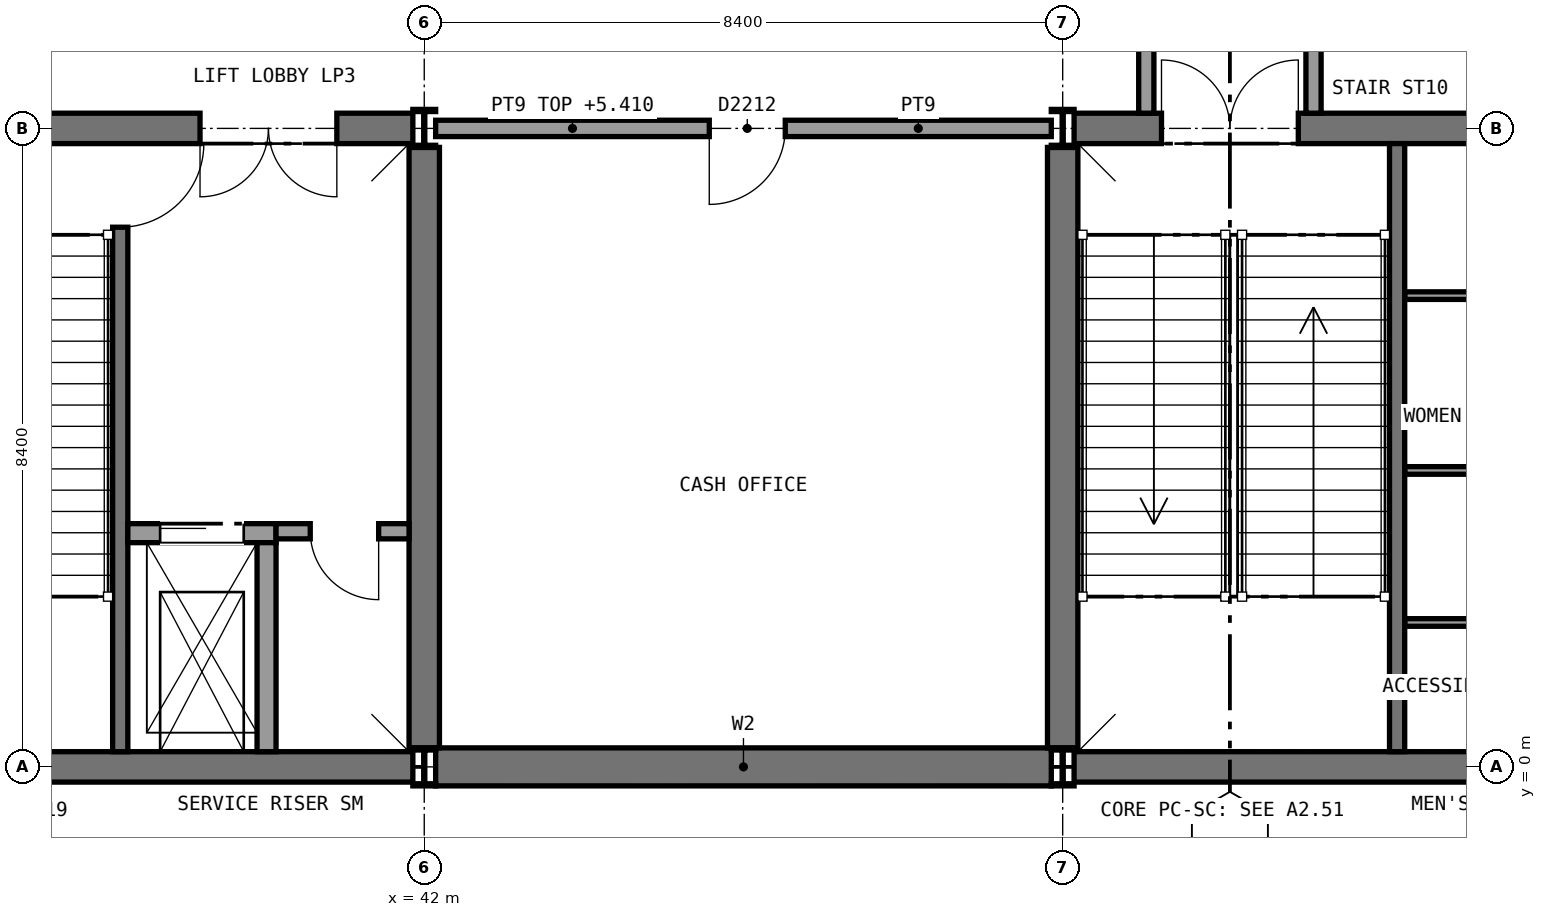
"""IFC4 building model, lengths in metres.
Left out: names, types, materials, properties, quantities, classifications, styles, units other than length and angle.
Written with IfcOpenShell. Run it as: python <this file> out.ifc"""

import sys

from ifc_helpers import new_model, si_unit, direction, frame, frame_2d, origin, origin_2d, place, context, subcontext, project, spatial, rectangle, i_section, extrude, element, fill, save


model = new_model("IFC4")
c1 = context("Model", 3, precision=1e-05, world=origin(), true_north=direction((0.0, 1.0)))
c2 = subcontext(c1, "Body", "Model", "MODEL_VIEW")
j1 = project(units=[si_unit("LENGTHUNIT", "METRE"), si_unit("PLANEANGLEUNIT", "RADIAN")], contexts=[c1])
p1 = place(None, origin())
s1 = spatial("IfcSite", under=j1, at=p1, CompositionType="ELEMENT")
p2 = place(p1, origin())
s2 = spatial("IfcBuilding", under=s1, at=p2, CompositionType="ELEMENT")
p3 = place(p2, origin())
s3 = spatial("IfcBuildingStorey", under=s2, at=p3, CompositionType="ELEMENT", Elevation=0.0)
p4 = place(p3, frame((42.15, 0.0, 0.0), z_axis=(0.0, 0.0, 1.0), x_axis=(1.0, 0.0, 0.0)))
e1 = element("IfcWall", 1, at=p4, inside=s3, PredefinedType="SHEAR", context=c2, shape_type="SweptSolid", body=[
    extrude(rectangle(XDim=8.1, YDim=0.5, at=frame_2d((4.05, 0.0))), origin(), (0.0, 0.0, 1.0), 5.85),
])
p5 = place(p3, frame((33.75, 0.0, 0.0), z_axis=(0.0, 0.0, 1.0), x_axis=(1.0, 0.0, 0.0)))
e2 = element("IfcWall", 2, at=p5, inside=s3, PredefinedType="SHEAR", context=c2, shape_type="SweptSolid", body=[
    extrude(rectangle(XDim=8.1, YDim=0.4, at=frame_2d((4.05, 0.0))), origin(), (0.0, 0.0, 1.0), 5.85),
])
p6 = place(p3, frame((33.75, 8.4, 0.0), z_axis=(0.0, 0.0, 1.0), x_axis=(1.0, 0.0, 0.0)))
e3 = element("IfcWall", 3, at=p6, inside=s3, PredefinedType="SHEAR", context=c2, shape_type="SweptSolid", body=[
    extrude(rectangle(XDim=8.1, YDim=0.4, at=frame_2d((4.05, 0.0))), origin(), (0.0, 0.0, 1.0), 5.85),
])
p7 = place(p6, frame((5.3, 0.0, 0.0)))
e4 = element("IfcOpeningElement", 4, at=p7, cuts=e3, PredefinedType="OPENING", context=c2, shape_type="SweptSolid", body=[
    extrude(rectangle(XDim=1.8, YDim=2.1, at=frame_2d((0.9, 1.05))), frame((0.0, 0.21, 0.0), z_axis=(0.0, -1.0, 0.0), x_axis=(1.0, 0.0, 0.0)), (0.0, 0.0, 1.0), 0.42),
])
p8 = place(p6, frame((1.15, 0.0, 0.0)))
e5 = element("IfcOpeningElement", 5, at=p8, cuts=e3, PredefinedType="OPENING", context=c2, shape_type="SweptSolid", body=[
    extrude(rectangle(XDim=1.8, YDim=2.1, at=frame_2d((0.9, 1.05))), frame((0.0, 0.21, 0.0), z_axis=(0.0, -1.0, 0.0), x_axis=(1.0, 0.0, 0.0)), (0.0, 0.0, 1.0), 0.42),
])
p9 = place(p3, frame((42.0, 0.25, 0.0), z_axis=(0.0, 0.0, 1.0), x_axis=(0.0, 1.0, 0.0)))
e6 = element("IfcWall", 6, at=p9, inside=s3, PredefinedType="SHEAR", context=c2, shape_type="SweptSolid", body=[
    extrude(rectangle(XDim=7.9, YDim=0.4, at=frame_2d((3.95, 0.0))), origin(), (0.0, 0.0, 1.0), 5.85),
])
p10 = place(p3, frame((50.55, 0.0, 0.0), z_axis=(0.0, 0.0, 1.0), x_axis=(1.0, 0.0, 0.0)))
e7 = element("IfcWall", 7, at=p10, inside=s3, PredefinedType="SHEAR", context=c2, shape_type="SweptSolid", body=[
    extrude(rectangle(XDim=8.1, YDim=0.4, at=frame_2d((4.05, 0.0))), origin(), (0.0, 0.0, 1.0), 5.85),
])
p11 = place(p3, frame((50.55, 8.4, 0.0), z_axis=(0.0, 0.0, 1.0), x_axis=(1.0, 0.0, 0.0)))
e8 = element("IfcWall", 8, at=p11, inside=s3, PredefinedType="SHEAR", context=c2, shape_type="SweptSolid", body=[
    extrude(rectangle(XDim=8.1, YDim=0.4, at=frame_2d((4.05, 0.0))), origin(), (0.0, 0.0, 1.0), 5.85),
])
p12 = place(p11, frame((5.6, 0.0, 0.0)))
e9 = element("IfcOpeningElement", 9, at=p12, cuts=e8, PredefinedType="OPENING", context=c2, shape_type="SweptSolid", body=[
    extrude(rectangle(XDim=1.2, YDim=2.1, at=frame_2d((0.6, 1.05))), frame((0.0, 0.21, 0.0), z_axis=(0.0, -1.0, 0.0), x_axis=(1.0, 0.0, 0.0)), (0.0, 0.0, 1.0), 0.42),
])
p13 = place(p11, frame((1.15, 0.0, 0.0)))
e10 = element("IfcOpeningElement", 10, at=p13, cuts=e8, PredefinedType="OPENING", context=c2, shape_type="SweptSolid", body=[
    extrude(rectangle(XDim=1.8, YDim=2.1, at=frame_2d((0.9, 1.05))), frame((0.0, 0.21, 0.0), z_axis=(0.0, -1.0, 0.0), x_axis=(1.0, 0.0, 0.0)), (0.0, 0.0, 1.0), 0.42),
])
p14 = place(p3, frame((50.4, 0.25, 0.0), z_axis=(0.0, 0.0, 1.0), x_axis=(0.0, 1.0, 0.0)))
e11 = element("IfcWall", 11, at=p14, inside=s3, PredefinedType="SHEAR", context=c2, shape_type="SweptSolid", body=[
    extrude(rectangle(XDim=7.9, YDim=0.4, at=frame_2d((3.95, 0.0))), origin(), (0.0, 0.0, 1.0), 5.85),
])
for number, where, z_axis, x_axis in (
    (12, (42.0, 0.0, 0.0), (0.0, 0.0, 1.0), (1.0, 0.0, 0.0)),
    (13, (42.0, 8.4, 0.0), (0.0, 0.0, 1.0), (1.0, 0.0, 0.0)),
    (14, (50.4, 0.0, 0.0), (0.0, 0.0, 1.0), (1.0, 0.0, 0.0)),
    (15, (50.4, 8.4, 0.0), (0.0, 0.0, 1.0), (1.0, 0.0, 0.0)),
):
    element("IfcColumn", number, at=place(p3, frame(where, z_axis=z_axis, x_axis=x_axis)), inside=s3, PredefinedType="COLUMN", context=c2, shape_type="SweptSolid", body=[
        extrude(i_section(OverallWidth=0.3, OverallDepth=0.5, WebThickness=0.014, FlangeThickness=0.028, FilletRadius=0.027, at=origin_2d()), origin(), (0.0, 0.0, 1.0), 6.0),
    ])
p15 = place(p3, frame((54.9, 6.2, 0.0), z_axis=(0.0, 0.0, 1.0), x_axis=(1.0, 0.0, 0.0)))
e16 = element("IfcWall", 16, at=p15, inside=s3, PredefinedType="PARTITIONING", context=c2, shape_type="SweptSolid", body=[
    extrude(rectangle(XDim=2.4, YDim=0.1, at=frame_2d((1.2, 0.0))), origin(), (0.0, 0.0, 1.0), 5.78),
])
p16 = place(p15, frame((0.85, 0.0, 0.0)))
e17 = element("IfcOpeningElement", 17, at=p16, cuts=e16, PredefinedType="OPENING", context=c2, shape_type="SweptSolid", body=[
    extrude(rectangle(XDim=0.9, YDim=2.1, at=frame_2d((0.45, 1.05))), frame((0.0, 0.06, 0.0), z_axis=(0.0, -1.0, 0.0), x_axis=(1.0, 0.0, 0.0)), (0.0, 0.0, 1.0), 0.12),
])
for number, where, z_axis, x_axis in (
    (18, (54.9, 3.9, 0.0), (0.0, 0.0, 1.0), (1.0, 0.0, 0.0)),
    (19, (54.9, 1.9, 0.0), (0.0, 0.0, 1.0), (1.0, 0.0, 0.0)),
):
    element("IfcWall", number, at=place(p3, frame(where, z_axis=z_axis, x_axis=x_axis)), inside=s3, PredefinedType="PARTITIONING", context=c2, shape_type="SweptSolid", body=[
        extrude(rectangle(XDim=2.4, YDim=0.1, at=frame_2d((1.2, 0.0))), origin(), (0.0, 0.0, 1.0), 5.78),
    ])
p17 = place(p3, frame((42.15, 8.4, 0.0), z_axis=(0.0, 0.0, 1.0), x_axis=(1.0, 0.0, 0.0)))
e20 = element("IfcWall", 20, at=p17, inside=s3, PredefinedType="SOLIDWALL", context=c2, shape_type="SweptSolid", body=[
    extrude(rectangle(XDim=8.1, YDim=0.215, at=frame_2d((4.05, 0.0))), origin(), (0.0, 0.0, 1.0), 5.41),
])
p18 = place(p17, frame((3.6, 0.0, 0.0)))
e21 = element("IfcOpeningElement", 21, at=p18, cuts=e20, PredefinedType="OPENING", context=c2, shape_type="SweptSolid", body=[
    extrude(rectangle(XDim=1.0, YDim=2.1, at=frame_2d((0.5, 1.05))), frame((0.0, 0.118, 0.0), z_axis=(0.0, -1.0, 0.0), x_axis=(1.0, 0.0, 0.0)), (0.0, 0.0, 1.0), 0.235),
])
p19 = place(p3, frame((38.0, 0.2, 0.0), z_axis=(0.0, 0.0, 1.0), x_axis=(0.0, 1.0, 0.0)))
e22 = element("IfcWall", 22, at=p19, inside=s3, PredefinedType="SHEAR", context=c2, shape_type="SweptSolid", body=[
    extrude(rectangle(XDim=8.0, YDim=0.2, at=frame_2d((4.0, 0.0))), origin(), (0.0, 0.0, 1.0), 5.85),
])
p20 = place(p19, frame((6.9, 0.0, 0.0)))
e23 = element("IfcOpeningElement", 23, at=p20, cuts=e22, PredefinedType="OPENING", context=c2, shape_type="SweptSolid", body=[
    extrude(rectangle(XDim=1.11, YDim=2.1, at=frame_2d((0.555, 1.05))), frame((0.0, 0.11, 0.0), z_axis=(0.0, -1.0, 0.0), x_axis=(1.0, 0.0, 0.0)), (0.0, 0.0, 1.0), 0.22),
])
p21 = place(p3, frame((38.1, 3.075, 0.0), z_axis=(0.0, 0.0, 1.0), x_axis=(1.0, 0.0, 0.0)))
e24 = element("IfcWall", 24, at=p21, inside=s3, PredefinedType="SOLIDWALL", context=c2, shape_type="SweptSolid", body=[
    extrude(rectangle(XDim=1.95, YDim=0.25, at=frame_2d((0.975, 0.0))), origin(), (0.0, 0.0, 1.0), 6.0),
])
p22 = place(p21, frame((0.425, 0.0, 0.0)))
e25 = element("IfcOpeningElement", 25, at=p22, cuts=e24, PredefinedType="OPENING", context=c2, shape_type="SweptSolid", body=[
    extrude(rectangle(XDim=1.1, YDim=2.1, at=frame_2d((0.55, 1.05))), frame((0.0, 0.135, 0.0), z_axis=(0.0, -1.0, 0.0), x_axis=(1.0, 0.0, 0.0)), (0.0, 0.0, 1.0), 0.27),
])
p23 = place(p3, frame((39.925, 0.2, 0.0), z_axis=(0.0, 0.0, 1.0), x_axis=(0.0, 1.0, 0.0)))
e26 = element("IfcWall", 26, at=p23, inside=s3, PredefinedType="SOLIDWALL", context=c2, shape_type="SweptSolid", body=[
    extrude(rectangle(XDim=2.75, YDim=0.25, at=frame_2d((1.375, 0.0))), origin(), (0.0, 0.0, 1.0), 6.0),
])
p24 = place(p3, frame((40.05, 3.1, 0.0), z_axis=(0.0, 0.0, 1.0), x_axis=(1.0, 0.0, 0.0)))
e27 = element("IfcWall", 27, at=p24, inside=s3, PredefinedType="PARTITIONING", context=c2, shape_type="SweptSolid", body=[
    extrude(rectangle(XDim=1.75, YDim=0.2, at=frame_2d((0.875, 0.0))), origin(), (0.0, 0.0, 1.0), 5.85),
])
p25 = place(p24, frame((0.45, 0.0, 0.0)))
e28 = element("IfcOpeningElement", 28, at=p25, cuts=e27, PredefinedType="OPENING", context=c2, shape_type="SweptSolid", body=[
    extrude(rectangle(XDim=0.9, YDim=2.1, at=frame_2d((0.45, 1.05))), frame((0.0, 0.11, 0.0), z_axis=(0.0, -1.0, 0.0), x_axis=(1.0, 0.0, 0.0)), (0.0, 0.0, 1.0), 0.22),
])
p26 = place(p3, frame((54.8, 0.2, 0.0), z_axis=(0.0, 0.0, 1.0), x_axis=(0.0, 1.0, 0.0)))
e29 = element("IfcWall", 29, at=p26, inside=s3, PredefinedType="SHEAR", context=c2, shape_type="SweptSolid", body=[
    extrude(rectangle(XDim=8.0, YDim=0.2, at=frame_2d((4.0, 0.0))), origin(), (0.0, 0.0, 1.0), 5.85),
])
for number, where, z_axis, x_axis in (
    (30, (51.5, 8.6, 0.0), (0.0, 0.0, 1.0), (0.0, 1.0, 0.0)),
    (31, (53.7, 8.6, 0.0), (0.0, 0.0, 1.0), (0.0, 1.0, 0.0)),
):
    element("IfcWall", number, at=place(p3, frame(where, z_axis=z_axis, x_axis=x_axis)), inside=s3, PredefinedType="PARTITIONING", context=c2, shape_type="SweptSolid", body=[
        extrude(rectangle(XDim=16.4, YDim=0.2, at=frame_2d((8.2, 0.0))), origin(), (0.0, 0.0, 1.0), 5.85),
    ])
p27 = place(p18, frame((1.0, 0.0, 0.0), z_axis=(0.0, 0.0, 1.0), x_axis=(-1.0, 0.0, 0.0)))
e32 = element("IfcDoor", 32, at=p27, inside=s3, OperationType="SINGLE_SWING_RIGHT", PredefinedType="DOOR", context=c2, shape_type="SweptSolid", body=[
    extrude(rectangle(XDim=1.0, YDim=2.1, at=frame_2d((0.5, 1.05))), frame((0.0, 0.025, 0.0), z_axis=(0.0, -1.0, 0.0), x_axis=(1.0, 0.0, 0.0)), (0.0, 0.0, 1.0), 0.05),
])
fill(e21, e32)
p28 = place(p20, frame((1.1, 0.0, 0.0), z_axis=(0.0, 0.0, 1.0), x_axis=(-1.0, 0.0, 0.0)))
e33 = element("IfcDoor", 33, at=p28, inside=s3, OperationType="SINGLE_SWING_LEFT", PredefinedType="DOOR", context=c2, shape_type="SweptSolid", body=[
    extrude(rectangle(XDim=1.1, YDim=2.1, at=frame_2d((0.55, 1.05))), frame((0.0, 0.025, 0.0), z_axis=(0.0, -1.0, 0.0), x_axis=(1.0, 0.0, 0.0)), (0.0, 0.0, 1.0), 0.05),
])
fill(e23, e33)
p29 = place(p22, origin())
e34 = element("IfcDoor", 34, at=p29, inside=s3, OperationType="SLIDING_TO_LEFT", PredefinedType="DOOR", context=c2, shape_type="SweptSolid", body=[
    extrude(rectangle(XDim=1.1, YDim=2.1, at=frame_2d((0.55, 1.05))), frame((0.0, 0.025, 0.0), z_axis=(0.0, -1.0, 0.0), x_axis=(1.0, 0.0, 0.0)), (0.0, 0.0, 1.0), 0.05),
])
fill(e25, e34)
p30 = place(p25, frame((0.9, 0.0, 0.0), z_axis=(0.0, 0.0, 1.0), x_axis=(-1.0, 0.0, 0.0)))
e35 = element("IfcDoor", 35, at=p30, inside=s3, OperationType="SINGLE_SWING_LEFT", PredefinedType="DOOR", context=c2, shape_type="SweptSolid", body=[
    extrude(rectangle(XDim=0.9, YDim=2.1, at=frame_2d((0.45, 1.05))), frame((0.0, 0.025, 0.0), z_axis=(0.0, -1.0, 0.0), x_axis=(1.0, 0.0, 0.0)), (0.0, 0.0, 1.0), 0.05),
])
fill(e28, e35)
p31 = place(p7, frame((1.8, 0.0, 0.0), z_axis=(0.0, 0.0, 1.0), x_axis=(-1.0, 0.0, 0.0)))
e36 = element("IfcDoor", 36, at=p31, inside=s3, OperationType="DOUBLE_DOOR_SINGLE_SWING", PredefinedType="DOOR", context=c2, shape_type="SweptSolid", body=[
    extrude(rectangle(XDim=1.8, YDim=2.1, at=frame_2d((0.9, 1.05))), frame((0.0, 0.025, 0.0), z_axis=(0.0, -1.0, 0.0), x_axis=(1.0, 0.0, 0.0)), (0.0, 0.0, 1.0), 0.05),
])
fill(e4, e36)
p32 = place(p13, origin())
e37 = element("IfcDoor", 37, at=p32, inside=s3, OperationType="DOUBLE_DOOR_SINGLE_SWING", PredefinedType="DOOR", context=c2, shape_type="SweptSolid", body=[
    extrude(rectangle(XDim=1.8, YDim=2.1, at=frame_2d((0.9, 1.05))), frame((0.0, 0.025, 0.0), z_axis=(0.0, -1.0, 0.0), x_axis=(1.0, 0.0, 0.0)), (0.0, 0.0, 1.0), 0.05),
])
fill(e10, e37)
save(model, sys.argv[1])
